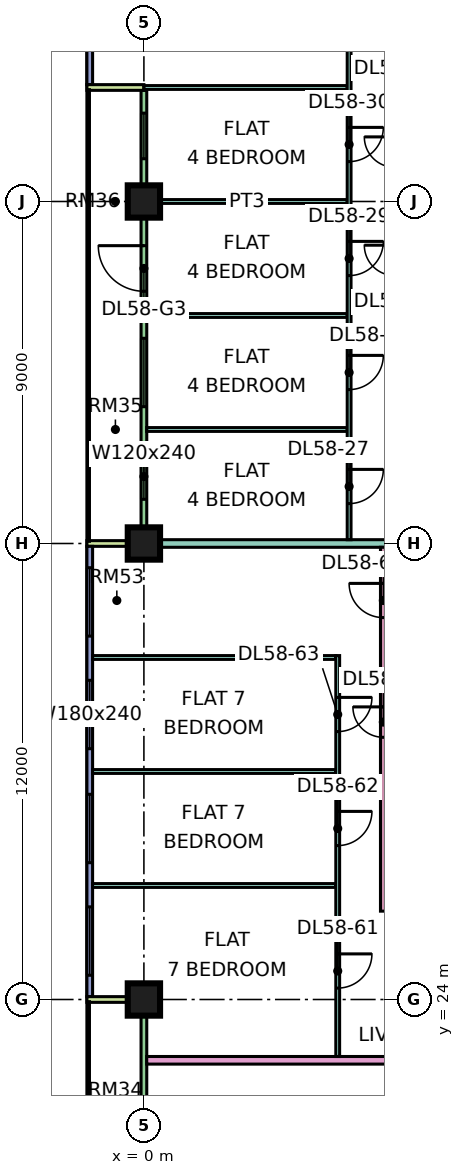
"""IFC4 building model, lengths in metres.
Left out: names, types, materials, properties, quantities, classifications, styles, units other than length and angle.
Written with IfcOpenShell. Run it as: python <this file> out.ifc"""

import sys

from ifc_helpers import new_model, si_unit, direction, frame, frame_2d, origin, origin_2d, place, context, subcontext, project, spatial, rectangle, extrude, element, fill, save


model = new_model("IFC4")
c1 = context("Model", 3, precision=1e-05, world=origin(), true_north=direction((0.0, 1.0)))
c2 = subcontext(c1, "Body", "Model", "MODEL_VIEW")
j1 = project(units=[si_unit("LENGTHUNIT", "METRE"), si_unit("PLANEANGLEUNIT", "RADIAN")], contexts=[c1])
p1 = place(None, origin())
s1 = spatial("IfcSite", under=j1, at=p1, CompositionType="ELEMENT")
p2 = place(p1, origin())
s2 = spatial("IfcBuilding", under=s1, at=p2, CompositionType="ELEMENT")
p3 = place(p2, frame((0.0, 0.0, 245.4)))
s3 = spatial("IfcBuildingStorey", under=s2, at=p3, CompositionType="ELEMENT", Elevation=245.4)
p4 = place(p3, frame((0.0, 24.0, 0.0), z_axis=(0.0, 0.0, 1.0), x_axis=(1.0, 0.0, 0.0)))
e1 = element("IfcColumn", 1, at=p4, inside=s3, PredefinedType="COLUMN", context=c2, shape_type="SweptSolid", body=[
    extrude(rectangle(XDim=0.85, YDim=0.85, at=origin_2d()), origin(), (0.0, 0.0, 1.0), 3.75),
])
p5 = place(p3, frame((0.0, 36.0, 0.0), z_axis=(0.0, 0.0, 1.0), x_axis=(1.0, 0.0, 0.0)))
e2 = element("IfcColumn", 2, at=p5, inside=s3, PredefinedType="COLUMN", context=c2, shape_type="SweptSolid", body=[
    extrude(rectangle(XDim=0.85, YDim=0.85, at=origin_2d()), origin(), (0.0, 0.0, 1.0), 3.75),
])
p6 = place(p3, frame((0.0, 45.0, 0.0), z_axis=(0.0, 0.0, 1.0), x_axis=(1.0, 0.0, 0.0)))
e3 = element("IfcColumn", 3, at=p6, inside=s3, PredefinedType="COLUMN", context=c2, shape_type="SweptSolid", body=[
    extrude(rectangle(XDim=0.85, YDim=0.85, at=origin_2d()), origin(), (0.0, 0.0, 1.0), 3.75),
])
p7 = place(p3, frame((-1.425, 61.5, 0.0), z_axis=(0.0, 0.0, 1.0), x_axis=(0.0, -1.0, 0.0)))
e4 = element("IfcWall", 4, at=p7, inside=s3, PredefinedType="SOLIDWALL", context=c2, shape_type="SweptSolid", body=[
    extrude(rectangle(XDim=13.425, YDim=0.15, at=frame_2d((6.712, 0.0))), origin(), (0.0, 0.0, 1.0), 3.35),
])
p8 = place(p7, frame((0.3, 0.0, 0.45)))
e5 = element("IfcOpeningElement", 5, at=p8, cuts=e4, PredefinedType="OPENING", context=c2, shape_type="SweptSolid", body=[
    extrude(rectangle(XDim=0.9, YDim=2.4, at=frame_2d((0.45, 1.2))), frame((0.0, 0.085, 0.0), z_axis=(0.0, -1.0, 0.0), x_axis=(1.0, 0.0, 0.0)), (0.0, 0.0, 1.0), 0.17),
])
p9 = place(p7, frame((2.1, 0.0, 0.45)))
e6 = element("IfcOpeningElement", 6, at=p9, cuts=e4, PredefinedType="OPENING", context=c2, shape_type="SweptSolid", body=[
    extrude(rectangle(XDim=1.8, YDim=2.4, at=frame_2d((0.9, 1.2))), frame((0.0, 0.085, 0.0), z_axis=(0.0, -1.0, 0.0), x_axis=(1.0, 0.0, 0.0)), (0.0, 0.0, 1.0), 0.17),
])
p10 = place(p7, frame((7.462, 0.0, 0.45)))
e7 = element("IfcOpeningElement", 7, at=p10, cuts=e4, PredefinedType="OPENING", context=c2, shape_type="SweptSolid", body=[
    extrude(rectangle(XDim=3.0, YDim=2.4, at=frame_2d((1.5, 1.2))), frame((0.0, 0.085, 0.0), z_axis=(0.0, -1.0, 0.0), x_axis=(1.0, 0.0, 0.0)), (0.0, 0.0, 1.0), 0.17),
])
p11 = place(p3, frame((0.0, 47.925, 0.0), z_axis=(0.0, 0.0, 1.0), x_axis=(0.0, -1.0, 0.0)))
e8 = element("IfcWall", 8, at=p11, inside=s3, PredefinedType="SOLIDWALL", context=c2, shape_type="SweptSolid", body=[
    extrude(rectangle(XDim=11.85, YDim=0.15, at=frame_2d((5.925, 0.0))), origin(), (0.0, 0.0, 1.0), 3.35),
])
p12 = place(p11, frame((0.6, 0.0, 0.45)))
e9 = element("IfcOpeningElement", 9, at=p12, cuts=e8, PredefinedType="OPENING", context=c2, shape_type="SweptSolid", body=[
    extrude(rectangle(XDim=1.2, YDim=2.4, at=frame_2d((0.6, 1.2))), frame((0.0, 0.085, 0.0), z_axis=(0.0, -1.0, 0.0), x_axis=(1.0, 0.0, 0.0)), (0.0, 0.0, 1.0), 0.17),
])
p13 = place(p11, frame((4.087, 0.0, 0.0)))
e10 = element("IfcOpeningElement", 10, at=p13, cuts=e8, PredefinedType="OPENING", context=c2, shape_type="SweptSolid", body=[
    extrude(rectangle(XDim=1.2, YDim=2.4, at=frame_2d((0.6, 1.2))), frame((0.0, 0.085, 0.0), z_axis=(0.0, -1.0, 0.0), x_axis=(1.0, 0.0, 0.0)), (0.0, 0.0, 1.0), 0.17),
])
p14 = place(p11, frame((6.525, 0.0, 0.45)))
e11 = element("IfcOpeningElement", 11, at=p14, cuts=e8, PredefinedType="OPENING", context=c2, shape_type="SweptSolid", body=[
    extrude(rectangle(XDim=1.8, YDim=2.4, at=frame_2d((0.9, 1.2))), frame((0.0, 0.085, 0.0), z_axis=(0.0, -1.0, 0.0), x_axis=(1.0, 0.0, 0.0)), (0.0, 0.0, 1.0), 0.17),
])
p15 = place(p11, frame((9.562, 0.0, 0.45)))
e12 = element("IfcOpeningElement", 12, at=p15, cuts=e8, PredefinedType="OPENING", context=c2, shape_type="SweptSolid", body=[
    extrude(rectangle(XDim=1.2, YDim=2.4, at=frame_2d((0.6, 1.2))), frame((0.0, 0.085, 0.0), z_axis=(0.0, -1.0, 0.0), x_axis=(1.0, 0.0, 0.0)), (0.0, 0.0, 1.0), 0.17),
])
for number, where, z_axis, x_axis in (
    (13, (-1.5, 48.0, 0.0), (0.0, 0.0, 1.0), (1.0, 0.0, 0.0)),
    (14, (-1.5, 36.0, 0.0), (0.0, 0.0, 1.0), (1.0, 0.0, 0.0)),
):
    element("IfcWall", number, at=place(p3, frame(where, z_axis=z_axis, x_axis=x_axis)), inside=s3, PredefinedType="SOLIDWALL", context=c2, shape_type="SweptSolid", body=[
        extrude(rectangle(XDim=1.5, YDim=0.15, at=frame_2d((0.75, 0.0))), origin(), (0.0, 0.0, 1.0), 3.35),
    ])
p16 = place(p3, frame((-1.425, 35.925, 0.0), z_axis=(0.0, 0.0, 1.0), x_axis=(0.0, -1.0, 0.0)))
e15 = element("IfcWall", 15, at=p16, inside=s3, PredefinedType="SOLIDWALL", context=c2, shape_type="SweptSolid", body=[
    extrude(rectangle(XDim=11.85, YDim=0.15, at=frame_2d((5.925, 0.0))), origin(), (0.0, 0.0, 1.0), 3.35),
])
p17 = place(p16, frame((0.562, 0.0, 0.45)))
e16 = element("IfcOpeningElement", 16, at=p17, cuts=e15, PredefinedType="OPENING", context=c2, shape_type="SweptSolid", body=[
    extrude(rectangle(XDim=1.8, YDim=2.4, at=frame_2d((0.9, 1.2))), frame((0.0, 0.085, 0.0), z_axis=(0.0, -1.0, 0.0), x_axis=(1.0, 0.0, 0.0)), (0.0, 0.0, 1.0), 0.17),
])
p18 = place(p16, frame((3.525, 0.0, 0.45)))
e17 = element("IfcOpeningElement", 17, at=p18, cuts=e15, PredefinedType="OPENING", context=c2, shape_type="SweptSolid", body=[
    extrude(rectangle(XDim=1.8, YDim=2.4, at=frame_2d((0.9, 1.2))), frame((0.0, 0.085, 0.0), z_axis=(0.0, -1.0, 0.0), x_axis=(1.0, 0.0, 0.0)), (0.0, 0.0, 1.0), 0.17),
])
p19 = place(p16, frame((6.525, 0.0, 0.45)))
e18 = element("IfcOpeningElement", 18, at=p19, cuts=e15, PredefinedType="OPENING", context=c2, shape_type="SweptSolid", body=[
    extrude(rectangle(XDim=1.8, YDim=2.4, at=frame_2d((0.9, 1.2))), frame((0.0, 0.085, 0.0), z_axis=(0.0, -1.0, 0.0), x_axis=(1.0, 0.0, 0.0)), (0.0, 0.0, 1.0), 0.17),
])
p20 = place(p16, frame((9.488, 0.0, 0.45)))
e19 = element("IfcOpeningElement", 19, at=p20, cuts=e15, PredefinedType="OPENING", context=c2, shape_type="SweptSolid", body=[
    extrude(rectangle(XDim=1.8, YDim=2.4, at=frame_2d((0.9, 1.2))), frame((0.0, 0.085, 0.0), z_axis=(0.0, -1.0, 0.0), x_axis=(1.0, 0.0, 0.0)), (0.0, 0.0, 1.0), 0.17),
])
p21 = place(p3, frame((0.0, 23.925, 0.0), z_axis=(0.0, 0.0, 1.0), x_axis=(0.0, -1.0, 0.0)))
e20 = element("IfcWall", 20, at=p21, inside=s3, PredefinedType="SOLIDWALL", context=c2, shape_type="SweptSolid", body=[
    extrude(rectangle(XDim=11.35, YDim=0.15, at=frame_2d((5.675, 0.0))), origin(), (0.0, 0.0, 1.0), 3.35),
])
p22 = place(p21, frame((6.738, 0.0, 0.0)))
e21 = element("IfcOpeningElement", 21, at=p22, cuts=e20, PredefinedType="OPENING", context=c2, shape_type="SweptSolid", body=[
    extrude(rectangle(XDim=1.8, YDim=2.4, at=frame_2d((0.9, 1.2))), frame((0.0, 0.085, 0.0), z_axis=(0.0, -1.0, 0.0), x_axis=(1.0, 0.0, 0.0)), (0.0, 0.0, 1.0), 0.17),
])
p23 = place(p3, frame((-1.5, 24.0, 0.0), z_axis=(0.0, 0.0, 1.0), x_axis=(1.0, 0.0, 0.0)))
e22 = element("IfcWall", 22, at=p23, inside=s3, PredefinedType="SOLIDWALL", context=c2, shape_type="SweptSolid", body=[
    extrude(rectangle(XDim=1.5, YDim=0.15, at=frame_2d((0.75, 0.0))), origin(), (0.0, 0.0, 1.0), 3.35),
])
for number, where, z_axis, x_axis in (
    (23, (-1.351, 27.0, 0.0), (0.0, 0.0, 1.0), (1.0, 0.0, 0.0)),
    (24, (-1.351, 30.0, 0.0), (0.0, 0.0, 1.0), (1.0, 0.0, 0.0)),
):
    element("IfcWall", number, at=place(p3, frame(where, z_axis=z_axis, x_axis=x_axis)), inside=s3, PredefinedType="PARTITIONING", context=c2, shape_type="SweptSolid", body=[
        extrude(rectangle(XDim=6.401, YDim=0.1, at=frame_2d((3.201, 0.0))), origin(), (0.0, 0.0, 1.0), 3.35),
    ])
p24 = place(p3, frame((-1.35, 33.0, 0.0), z_axis=(0.0, 0.0, 1.0), x_axis=(1.0, 0.0, 0.0)))
e25 = element("IfcWall", 25, at=p24, inside=s3, PredefinedType="PARTITIONING", context=c2, shape_type="SweptSolid", body=[
    extrude(rectangle(XDim=6.4, YDim=0.1, at=frame_2d((3.2, 0.0))), origin(), (0.0, 0.0, 1.0), 3.35),
])
e26 = element("IfcWall", 26, at=p5, inside=s3, PredefinedType="PARTITIONING", context=c2, shape_type="SweptSolid", body=[
    extrude(rectangle(XDim=6.375, YDim=0.2, at=frame_2d((3.188, 0.0))), origin(), (0.0, 0.0, 1.0), 3.35),
])
p25 = place(p3, frame((0.0, 48.0, 0.0), z_axis=(0.0, 0.0, 1.0), x_axis=(1.0, 0.0, 0.0)))
e27 = element("IfcWall", 27, at=p25, inside=s3, PredefinedType="PARTITIONING", context=c2, shape_type="SweptSolid", body=[
    extrude(rectangle(XDim=5.35, YDim=0.1, at=frame_2d((2.675, 0.0))), origin(), (0.0, 0.0, 1.0), 3.35),
])
p26 = place(p3, frame((0.074, 22.4, 0.0), z_axis=(0.0, 0.0, 1.0), x_axis=(1.0, 0.0, 0.0)))
e28 = element("IfcWall", 28, at=p26, inside=s3, PredefinedType="PARTITIONING", context=c2, shape_type="SweptSolid", body=[
    extrude(rectangle(XDim=9.426, YDim=0.2, at=frame_2d((4.713, 0.0))), origin(), (0.0, 0.0, 1.0), 3.35),
])
for number, where, z_axis, x_axis in (
    (29, (0.074, 39.0, 0.0), (0.0, 0.0, 1.0), (1.0, 0.0, 0.0)),
    (30, (0.074, 42.0, 0.0), (0.0, 0.0, 1.0), (1.0, 0.0, 0.0)),
    (31, (0.074, 45.0, 0.0), (0.0, 0.0, 1.0), (1.0, 0.0, 0.0)),
):
    element("IfcWall", number, at=place(p3, frame(where, z_axis=z_axis, x_axis=x_axis)), inside=s3, PredefinedType="PARTITIONING", context=c2, shape_type="SweptSolid", body=[
        extrude(rectangle(XDim=5.276, YDim=0.1, at=frame_2d((2.638, 0.0))), origin(), (0.0, 0.0, 1.0), 3.35),
    ])
p27 = place(p3, frame((5.1, 22.5, 0.0), z_axis=(0.0, 0.0, 1.0), x_axis=(0.0, 1.0, 0.0)))
e32 = element("IfcWall", 32, at=p27, inside=s3, PredefinedType="PARTITIONING", context=c2, shape_type="SweptSolid", body=[
    extrude(rectangle(XDim=10.55, YDim=0.1, at=frame_2d((5.275, 0.0))), origin(), (0.0, 0.0, 1.0), 3.35),
])
p28 = place(p27, frame((1.8, 0.0, 0.0)))
e33 = element("IfcOpeningElement", 33, at=p28, cuts=e32, PredefinedType="OPENING", context=c2, shape_type="SweptSolid", body=[
    extrude(rectangle(XDim=0.9, YDim=2.1, at=frame_2d((0.45, 1.05))), frame((0.0, 0.06, 0.0), z_axis=(0.0, -1.0, 0.0), x_axis=(1.0, 0.0, 0.0)), (0.0, 0.0, 1.0), 0.12),
])
p29 = place(p27, frame((5.55, 0.0, 0.0)))
e34 = element("IfcOpeningElement", 34, at=p29, cuts=e32, PredefinedType="OPENING", context=c2, shape_type="SweptSolid", body=[
    extrude(rectangle(XDim=0.9, YDim=2.1, at=frame_2d((0.45, 1.05))), frame((0.0, 0.06, 0.0), z_axis=(0.0, -1.0, 0.0), x_axis=(1.0, 0.0, 0.0)), (0.0, 0.0, 1.0), 0.12),
])
p30 = place(p27, frame((8.55, 0.0, 0.0)))
e35 = element("IfcOpeningElement", 35, at=p30, cuts=e32, PredefinedType="OPENING", context=c2, shape_type="SweptSolid", body=[
    extrude(rectangle(XDim=0.9, YDim=2.1, at=frame_2d((0.45, 1.05))), frame((0.0, 0.06, 0.0), z_axis=(0.0, -1.0, 0.0), x_axis=(1.0, 0.0, 0.0)), (0.0, 0.0, 1.0), 0.12),
])
p31 = place(p3, frame((5.4, 36.1, 0.0), z_axis=(0.0, 0.0, 1.0), x_axis=(0.0, 1.0, 0.0)))
e36 = element("IfcWall", 36, at=p31, inside=s3, PredefinedType="PARTITIONING", context=c2, shape_type="SweptSolid", body=[
    extrude(rectangle(XDim=26.95, YDim=0.1, at=frame_2d((13.475, 0.0))), origin(), (0.0, 0.0, 1.0), 3.35),
])
p32 = place(p31, frame((0.95, 0.0, 0.0)))
e37 = element("IfcOpeningElement", 37, at=p32, cuts=e36, PredefinedType="OPENING", context=c2, shape_type="SweptSolid", body=[
    extrude(rectangle(XDim=0.9, YDim=2.1, at=frame_2d((0.45, 1.05))), frame((0.0, 0.06, 0.0), z_axis=(0.0, -1.0, 0.0), x_axis=(1.0, 0.0, 0.0)), (0.0, 0.0, 1.0), 0.12),
])
p33 = place(p31, frame((3.95, 0.0, 0.0)))
e38 = element("IfcOpeningElement", 38, at=p33, cuts=e36, PredefinedType="OPENING", context=c2, shape_type="SweptSolid", body=[
    extrude(rectangle(XDim=0.9, YDim=2.1, at=frame_2d((0.45, 1.05))), frame((0.0, 0.06, 0.0), z_axis=(0.0, -1.0, 0.0), x_axis=(1.0, 0.0, 0.0)), (0.0, 0.0, 1.0), 0.12),
])
p34 = place(p31, frame((6.95, 0.0, 0.0)))
e39 = element("IfcOpeningElement", 39, at=p34, cuts=e36, PredefinedType="OPENING", context=c2, shape_type="SweptSolid", body=[
    extrude(rectangle(XDim=0.9, YDim=2.1, at=frame_2d((0.45, 1.05))), frame((0.0, 0.06, 0.0), z_axis=(0.0, -1.0, 0.0), x_axis=(1.0, 0.0, 0.0)), (0.0, 0.0, 1.0), 0.12),
])
p35 = place(p31, frame((9.95, 0.0, 0.0)))
e40 = element("IfcOpeningElement", 40, at=p35, cuts=e36, PredefinedType="OPENING", context=c2, shape_type="SweptSolid", body=[
    extrude(rectangle(XDim=0.9, YDim=2.1, at=frame_2d((0.45, 1.05))), frame((0.0, 0.06, 0.0), z_axis=(0.0, -1.0, 0.0), x_axis=(1.0, 0.0, 0.0)), (0.0, 0.0, 1.0), 0.12),
])
p36 = place(p31, frame((21.95, 0.0, 0.0)))
e41 = element("IfcOpeningElement", 41, at=p36, cuts=e36, PredefinedType="OPENING", context=c2, shape_type="SweptSolid", body=[
    extrude(rectangle(XDim=0.9, YDim=2.1, at=frame_2d((0.45, 1.05))), frame((0.0, 0.06, 0.0), z_axis=(0.0, -1.0, 0.0), x_axis=(1.0, 0.0, 0.0)), (0.0, 0.0, 1.0), 0.12),
])
p37 = place(p31, frame((24.95, 0.0, 0.0)))
e42 = element("IfcOpeningElement", 42, at=p37, cuts=e36, PredefinedType="OPENING", context=c2, shape_type="SweptSolid", body=[
    extrude(rectangle(XDim=0.9, YDim=2.1, at=frame_2d((0.45, 1.05))), frame((0.0, 0.06, 0.0), z_axis=(0.0, -1.0, 0.0), x_axis=(1.0, 0.0, 0.0)), (0.0, 0.0, 1.0), 0.12),
])
p38 = place(p31, frame((15.95, 0.0, 0.0)))
e43 = element("IfcOpeningElement", 43, at=p38, cuts=e36, PredefinedType="OPENING", context=c2, shape_type="SweptSolid", body=[
    extrude(rectangle(XDim=0.9, YDim=2.1, at=frame_2d((0.45, 1.05))), frame((0.0, 0.06, 0.0), z_axis=(0.0, -1.0, 0.0), x_axis=(1.0, 0.0, 0.0)), (0.0, 0.0, 1.0), 0.12),
])
p39 = place(p3, frame((6.3, 26.325, 0.0), z_axis=(0.0, 0.0, 1.0), x_axis=(0.0, 1.0, 0.0)))
e44 = element("IfcWall", 44, at=p39, inside=s3, PredefinedType="PARTITIONING", context=c2, shape_type="SweptSolid", body=[
    extrude(rectangle(XDim=9.575, YDim=0.15, at=frame_2d((4.788, 0.0))), origin(), (0.0, 0.0, 1.0), 3.35),
])
p40 = place(p39, frame((4.575, 0.0, 0.0)))
e45 = element("IfcOpeningElement", 45, at=p40, cuts=e44, PredefinedType="OPENING", context=c2, shape_type="SweptSolid", body=[
    extrude(rectangle(XDim=0.8, YDim=2.1, at=frame_2d((0.4, 1.05))), frame((0.0, 0.085, 0.0), z_axis=(0.0, -1.0, 0.0), x_axis=(1.0, 0.0, 0.0)), (0.0, 0.0, 1.0), 0.17),
])
p41 = place(p39, frame((7.725, 0.0, 0.0)))
e46 = element("IfcOpeningElement", 46, at=p41, cuts=e44, PredefinedType="OPENING", context=c2, shape_type="SweptSolid", body=[
    extrude(rectangle(XDim=0.9, YDim=2.1, at=frame_2d((0.45, 1.05))), frame((0.0, 0.085, 0.0), z_axis=(0.0, -1.0, 0.0), x_axis=(1.0, 0.0, 0.0)), (0.0, 0.0, 1.0), 0.17),
])
p42 = place(p12, origin())
e47 = element("IfcWindow", 47, at=p42, inside=s3, PartitioningType="SINGLE_PANEL", PredefinedType="WINDOW", context=c2, shape_type="SweptSolid", body=[
    extrude(rectangle(XDim=1.2, YDim=2.4, at=frame_2d((0.6, 1.2))), frame((0.0, 0.03, 0.0), z_axis=(0.0, -1.0, 0.0), x_axis=(1.0, 0.0, 0.0)), (0.0, 0.0, 1.0), 0.06),
])
fill(e9, e47)
p43 = place(p13, frame((1.2, 0.0, 0.0), z_axis=(0.0, 0.0, 1.0), x_axis=(-1.0, 0.0, 0.0)))
e48 = element("IfcDoor", 48, at=p43, inside=s3, OperationType="DOUBLE_DOOR_SINGLE_SWING", PredefinedType="DOOR", context=c2, shape_type="SweptSolid", body=[
    extrude(rectangle(XDim=1.2, YDim=2.4, at=frame_2d((0.6, 1.2))), frame((0.0, 0.025, 0.0), z_axis=(0.0, -1.0, 0.0), x_axis=(1.0, 0.0, 0.0)), (0.0, 0.0, 1.0), 0.05),
])
fill(e10, e48)
p44 = place(p14, origin())
e49 = element("IfcWindow", 49, at=p44, inside=s3, PartitioningType="SINGLE_PANEL", PredefinedType="WINDOW", context=c2, shape_type="SweptSolid", body=[
    extrude(rectangle(XDim=1.8, YDim=2.4, at=frame_2d((0.9, 1.2))), frame((0.0, 0.03, 0.0), z_axis=(0.0, -1.0, 0.0), x_axis=(1.0, 0.0, 0.0)), (0.0, 0.0, 1.0), 0.06),
])
fill(e11, e49)
p45 = place(p15, origin())
e50 = element("IfcWindow", 50, at=p45, inside=s3, PartitioningType="SINGLE_PANEL", PredefinedType="WINDOW", context=c2, shape_type="SweptSolid", body=[
    extrude(rectangle(XDim=1.2, YDim=2.4, at=frame_2d((0.6, 1.2))), frame((0.0, 0.03, 0.0), z_axis=(0.0, -1.0, 0.0), x_axis=(1.0, 0.0, 0.0)), (0.0, 0.0, 1.0), 0.06),
])
fill(e12, e50)
p46 = place(p17, origin())
e51 = element("IfcWindow", 51, at=p46, inside=s3, PartitioningType="SINGLE_PANEL", PredefinedType="WINDOW", context=c2, shape_type="SweptSolid", body=[
    extrude(rectangle(XDim=1.8, YDim=2.4, at=frame_2d((0.9, 1.2))), frame((0.0, 0.03, 0.0), z_axis=(0.0, -1.0, 0.0), x_axis=(1.0, 0.0, 0.0)), (0.0, 0.0, 1.0), 0.06),
])
fill(e16, e51)
p47 = place(p18, origin())
e52 = element("IfcWindow", 52, at=p47, inside=s3, PartitioningType="SINGLE_PANEL", PredefinedType="WINDOW", context=c2, shape_type="SweptSolid", body=[
    extrude(rectangle(XDim=1.8, YDim=2.4, at=frame_2d((0.9, 1.2))), frame((0.0, 0.03, 0.0), z_axis=(0.0, -1.0, 0.0), x_axis=(1.0, 0.0, 0.0)), (0.0, 0.0, 1.0), 0.06),
])
fill(e17, e52)
p48 = place(p19, origin())
e53 = element("IfcWindow", 53, at=p48, inside=s3, PartitioningType="SINGLE_PANEL", PredefinedType="WINDOW", context=c2, shape_type="SweptSolid", body=[
    extrude(rectangle(XDim=1.8, YDim=2.4, at=frame_2d((0.9, 1.2))), frame((0.0, 0.03, 0.0), z_axis=(0.0, -1.0, 0.0), x_axis=(1.0, 0.0, 0.0)), (0.0, 0.0, 1.0), 0.06),
])
fill(e18, e53)
p49 = place(p20, origin())
e54 = element("IfcWindow", 54, at=p49, inside=s3, PartitioningType="SINGLE_PANEL", PredefinedType="WINDOW", context=c2, shape_type="SweptSolid", body=[
    extrude(rectangle(XDim=1.8, YDim=2.4, at=frame_2d((0.9, 1.2))), frame((0.0, 0.03, 0.0), z_axis=(0.0, -1.0, 0.0), x_axis=(1.0, 0.0, 0.0)), (0.0, 0.0, 1.0), 0.06),
])
fill(e19, e54)
p50 = place(p32, origin())
e55 = element("IfcDoor", 55, at=p50, inside=s3, OperationType="SINGLE_SWING_RIGHT", PredefinedType="DOOR", context=c2, shape_type="SweptSolid", body=[
    extrude(rectangle(XDim=0.9, YDim=2.1, at=frame_2d((0.45, 1.05))), frame((0.0, 0.025, 0.0), z_axis=(0.0, -1.0, 0.0), x_axis=(1.0, 0.0, 0.0)), (0.0, 0.0, 1.0), 0.05),
])
fill(e37, e55)
p51 = place(p33, origin())
e56 = element("IfcDoor", 56, at=p51, inside=s3, OperationType="SINGLE_SWING_RIGHT", PredefinedType="DOOR", context=c2, shape_type="SweptSolid", body=[
    extrude(rectangle(XDim=0.9, YDim=2.1, at=frame_2d((0.45, 1.05))), frame((0.0, 0.025, 0.0), z_axis=(0.0, -1.0, 0.0), x_axis=(1.0, 0.0, 0.0)), (0.0, 0.0, 1.0), 0.05),
])
fill(e38, e56)
p52 = place(p34, origin())
e57 = element("IfcDoor", 57, at=p52, inside=s3, OperationType="SINGLE_SWING_RIGHT", PredefinedType="DOOR", context=c2, shape_type="SweptSolid", body=[
    extrude(rectangle(XDim=0.9, YDim=2.1, at=frame_2d((0.45, 1.05))), frame((0.0, 0.025, 0.0), z_axis=(0.0, -1.0, 0.0), x_axis=(1.0, 0.0, 0.0)), (0.0, 0.0, 1.0), 0.05),
])
fill(e39, e57)
p53 = place(p35, origin())
e58 = element("IfcDoor", 58, at=p53, inside=s3, OperationType="SINGLE_SWING_RIGHT", PredefinedType="DOOR", context=c2, shape_type="SweptSolid", body=[
    extrude(rectangle(XDim=0.9, YDim=2.1, at=frame_2d((0.45, 1.05))), frame((0.0, 0.025, 0.0), z_axis=(0.0, -1.0, 0.0), x_axis=(1.0, 0.0, 0.0)), (0.0, 0.0, 1.0), 0.05),
])
fill(e40, e58)
p54 = place(p40, frame((0.8, 0.0, 0.0), z_axis=(0.0, 0.0, 1.0), x_axis=(-1.0, 0.0, 0.0)))
e59 = element("IfcDoor", 59, at=p54, inside=s3, OperationType="SINGLE_SWING_RIGHT", PredefinedType="DOOR", context=c2, shape_type="SweptSolid", body=[
    extrude(rectangle(XDim=0.8, YDim=2.1, at=frame_2d((0.4, 1.05))), frame((0.0, 0.025, 0.0), z_axis=(0.0, -1.0, 0.0), x_axis=(1.0, 0.0, 0.0)), (0.0, 0.0, 1.0), 0.05),
])
fill(e45, e59)
p55 = place(p28, origin())
e60 = element("IfcDoor", 60, at=p55, inside=s3, OperationType="SINGLE_SWING_RIGHT", PredefinedType="DOOR", context=c2, shape_type="SweptSolid", body=[
    extrude(rectangle(XDim=0.9, YDim=2.1, at=frame_2d((0.45, 1.05))), frame((0.0, 0.025, 0.0), z_axis=(0.0, -1.0, 0.0), x_axis=(1.0, 0.0, 0.0)), (0.0, 0.0, 1.0), 0.05),
])
fill(e33, e60)
p56 = place(p29, origin())
e61 = element("IfcDoor", 61, at=p56, inside=s3, OperationType="SINGLE_SWING_RIGHT", PredefinedType="DOOR", context=c2, shape_type="SweptSolid", body=[
    extrude(rectangle(XDim=0.9, YDim=2.1, at=frame_2d((0.45, 1.05))), frame((0.0, 0.025, 0.0), z_axis=(0.0, -1.0, 0.0), x_axis=(1.0, 0.0, 0.0)), (0.0, 0.0, 1.0), 0.05),
])
fill(e34, e61)
p57 = place(p30, origin())
e62 = element("IfcDoor", 62, at=p57, inside=s3, OperationType="SINGLE_SWING_RIGHT", PredefinedType="DOOR", context=c2, shape_type="SweptSolid", body=[
    extrude(rectangle(XDim=0.9, YDim=2.1, at=frame_2d((0.45, 1.05))), frame((0.0, 0.025, 0.0), z_axis=(0.0, -1.0, 0.0), x_axis=(1.0, 0.0, 0.0)), (0.0, 0.0, 1.0), 0.05),
])
fill(e35, e62)
p58 = place(p41, frame((0.9, 0.0, 0.0), z_axis=(0.0, 0.0, 1.0), x_axis=(-1.0, 0.0, 0.0)))
e63 = element("IfcDoor", 63, at=p58, inside=s3, OperationType="SINGLE_SWING_RIGHT", PredefinedType="DOOR", context=c2, shape_type="SweptSolid", body=[
    extrude(rectangle(XDim=0.9, YDim=2.1, at=frame_2d((0.45, 1.05))), frame((0.0, 0.025, 0.0), z_axis=(0.0, -1.0, 0.0), x_axis=(1.0, 0.0, 0.0)), (0.0, 0.0, 1.0), 0.05),
])
fill(e46, e63)
save(model, sys.argv[1])
